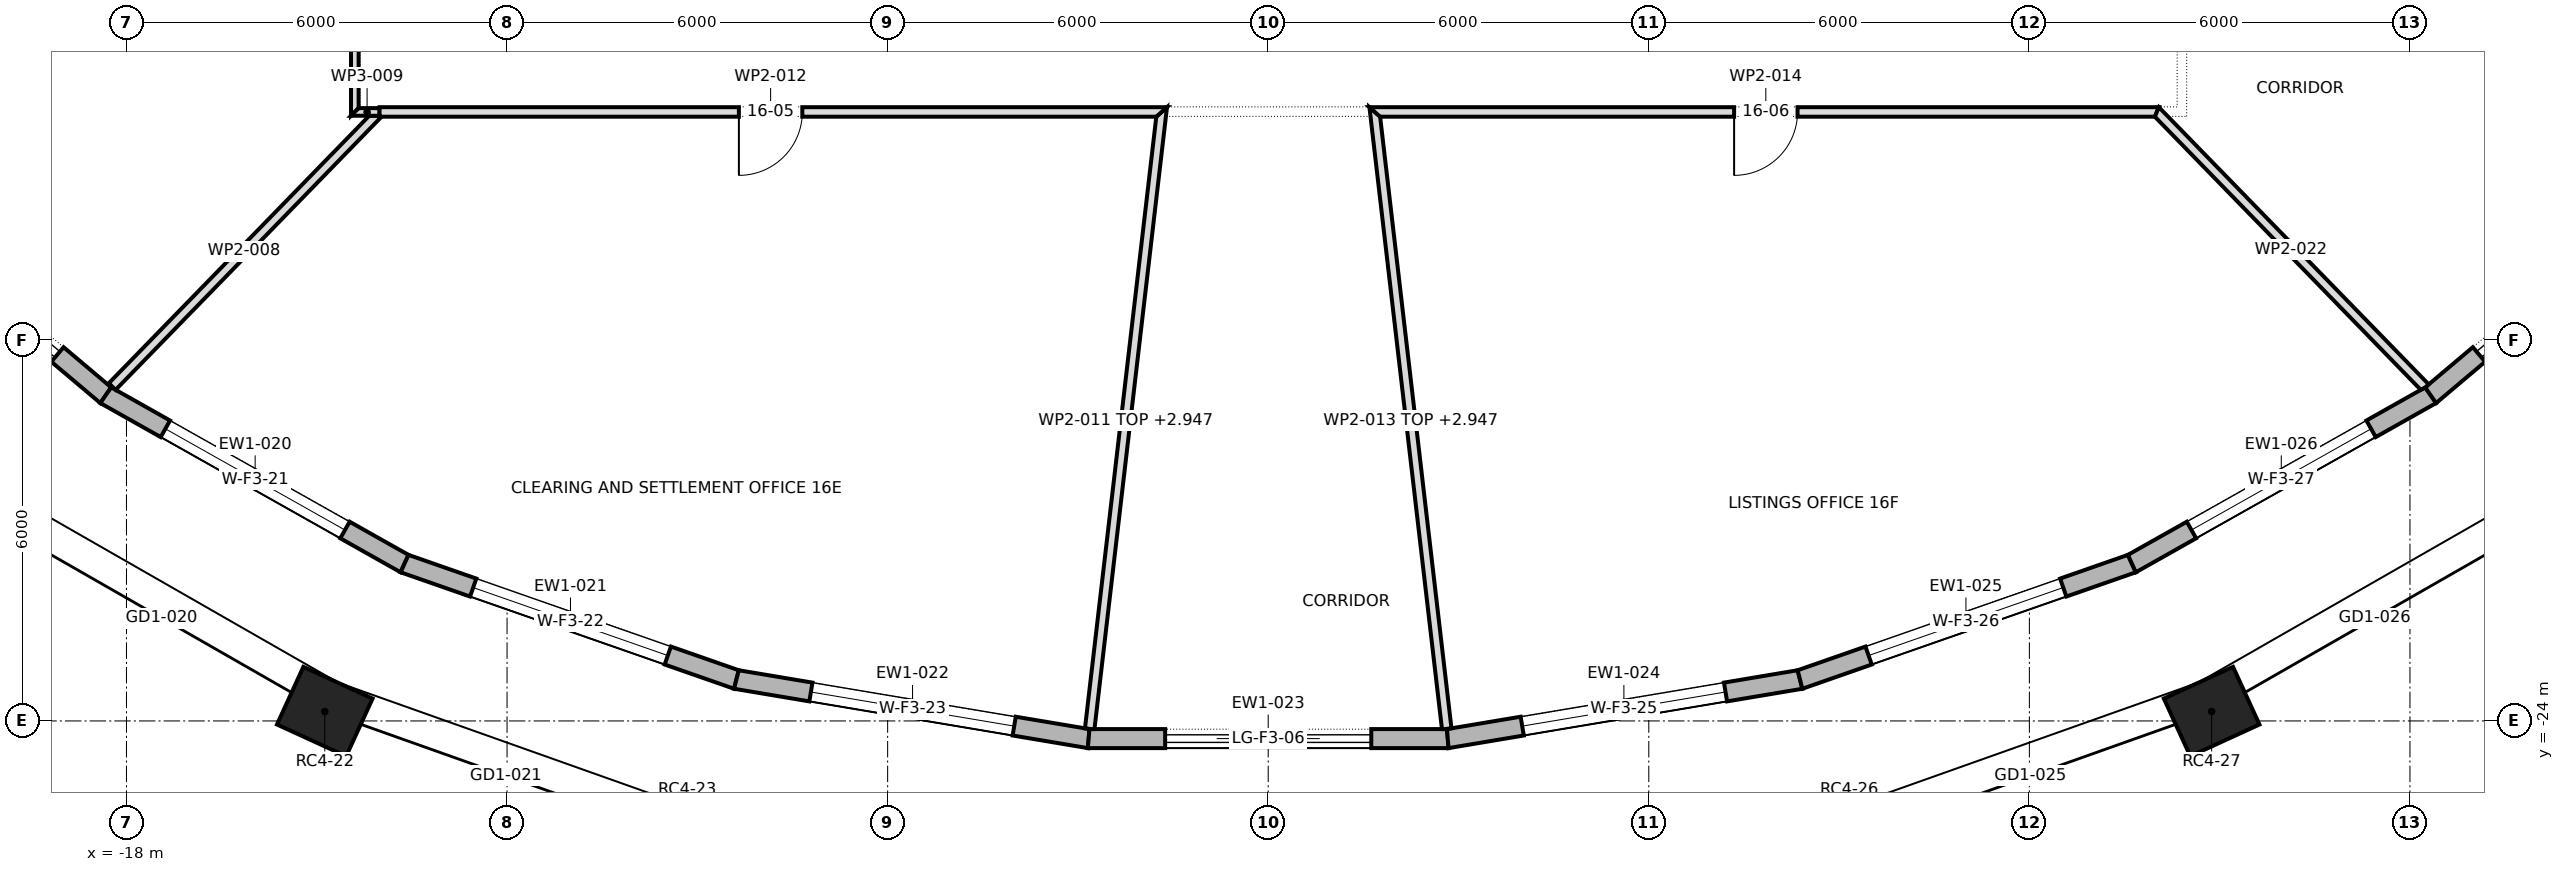
"""IFC4 building model, lengths in metres.
Left out: names, types, materials, properties, quantities, classifications, styles, units other than length and angle.
Written with IfcOpenShell. Run it as: python <this file> out.ifc"""

import sys

from ifc_helpers import new_model, si_unit, direction, frame, frame_2d, origin, origin_2d, place, context, subcontext, project, spatial, polyline, rectangle, outline, extrude, element, fill, save


model = new_model("IFC4")
c1 = context("Model", 3, precision=1e-05, world=origin(), true_north=direction((0.0, 1.0)))
c2 = subcontext(c1, "Body", "Model", "MODEL_VIEW")
j1 = project(units=[si_unit("LENGTHUNIT", "METRE"), si_unit("PLANEANGLEUNIT", "RADIAN")], contexts=[c1])
p1 = place(None, origin())
s1 = spatial("IfcSite", under=j1, at=p1, CompositionType="ELEMENT")
p2 = place(p1, origin())
s2 = spatial("IfcBuilding", under=s1, at=p2, CompositionType="ELEMENT")
p3 = place(p2, frame((0.0, 0.0, 226.9)))
s3 = spatial("IfcBuildingStorey", under=s2, at=p3, CompositionType="ELEMENT", Elevation=226.9)
for number, where, z_axis, x_axis in (
    (1, (-14.874, -23.852, 0.0), (0.0, 0.0, 1.0), (0.909, -0.417, 0.0)),
    (2, (14.874, -23.852, 0.0), (0.0, 0.0, 1.0), (0.909, 0.417, 0.0)),
):
    element("IfcColumn", number, at=place(p3, frame(where, z_axis=z_axis, x_axis=x_axis)), inside=s3, PredefinedType="COLUMN", context=c2, shape_type="SweptSolid", body=[
        extrude(rectangle(XDim=1.2, YDim=1.0, at=origin_2d()), origin(), (0.0, 0.0, 1.0), 4.0),
    ])
p4 = place(p3, frame((-22.334, -15.486, 0.0), z_axis=(0.0, 0.0, 1.0), x_axis=(0.764475071601, -0.644653290459, 0.0)))
e3 = element("IfcWall", 3, at=p4, inside=s3, PredefinedType="STANDARD", context=c2, shape_type="SweptSolid", body=[
    extrude(outline(polyline([(-0.015, -0.15), (5.257, -0.15), (5.229, 0.15), (0.015, 0.15), (-0.015, -0.15)])), origin(), (0.0, 0.0, 1.0), 3.7),
])
p5 = place(p4, frame((0.996, 0.0, 0.0)))
e4 = element("IfcOpeningElement", 4, at=p5, cuts=e3, PredefinedType="OPENING", context=c2, shape_type="SweptSolid", body=[
    extrude(rectangle(XDim=3.25, YDim=3.25, at=frame_2d((1.625, 1.625))), frame((0.0, 0.162, 0.0), z_axis=(0.0, -1.0, 0.0), x_axis=(1.0, 0.0, 0.0)), (0.0, 0.0, 1.0), 0.324),
])
p6 = place(p3, frame((-18.326, -18.865, 0.0), z_axis=(0.0, 0.0, 1.0), x_axis=(0.871225596594, -0.490882837181, 0.0)))
e5 = element("IfcWall", 5, at=p6, inside=s3, PredefinedType="STANDARD", context=c2, shape_type="SweptSolid", body=[
    extrude(outline(polyline([(-0.014, -0.15), (5.42, -0.15), (5.393, 0.15), (0.014, 0.15), (-0.014, -0.15)])), origin(), (0.0, 0.0, 1.0), 3.7),
])
p7 = place(p6, frame((1.078, 0.0, 0.6)))
e6 = element("IfcOpeningElement", 6, at=p7, cuts=e5, PredefinedType="OPENING", context=c2, shape_type="SweptSolid", body=[
    extrude(rectangle(XDim=3.25, YDim=2.65, at=frame_2d((1.625, 1.325))), frame((0.0, 0.162, 0.0), z_axis=(0.0, -1.0, 0.0), x_axis=(1.0, 0.0, 0.0)), (0.0, 0.0, 1.0), 0.324),
])
p8 = place(p3, frame((-13.616, -21.52, 0.0), z_axis=(0.0, 0.0, 1.0), x_axis=(0.944075859918, -0.329728328659, 0.0)))
e7 = element("IfcWall", 7, at=p8, inside=s3, PredefinedType="STANDARD", context=c2, shape_type="SweptSolid", body=[
    extrude(outline(polyline([(-0.013, -0.15), (5.555, -0.15), (5.53, 0.15), (0.013, 0.15), (-0.013, -0.15)])), origin(), (0.0, 0.0, 1.0), 3.7),
])
p9 = place(p8, frame((1.146, 0.0, 0.6)))
e8 = element("IfcOpeningElement", 8, at=p9, cuts=e7, PredefinedType="OPENING", context=c2, shape_type="SweptSolid", body=[
    extrude(rectangle(XDim=3.25, YDim=2.65, at=frame_2d((1.625, 1.325))), frame((0.0, 0.162, 0.0), z_axis=(0.0, -1.0, 0.0), x_axis=(1.0, 0.0, 0.0)), (0.0, 0.0, 1.0), 0.324),
])
p10 = place(p3, frame((-8.384, -23.347, 0.0), z_axis=(0.0, 0.0, 1.0), x_axis=(0.986223472554, -0.165418445715, 0.0)))
e9 = element("IfcWall", 9, at=p10, inside=s3, PredefinedType="STANDARD", context=c2, shape_type="SweptSolid", body=[
    extrude(outline(polyline([(-0.013, -0.15), (5.643, -0.15), (5.618, 0.15), (0.013, 0.15), (-0.013, -0.15)])), origin(), (0.0, 0.0, 1.0), 3.7),
])
p11 = place(p10, frame((1.19, 0.0, 0.6)))
e10 = element("IfcOpeningElement", 10, at=p11, cuts=e9, PredefinedType="OPENING", context=c2, shape_type="SweptSolid", body=[
    extrude(rectangle(XDim=3.25, YDim=2.65, at=frame_2d((1.625, 1.325))), frame((0.0, 0.162, 0.0), z_axis=(0.0, -1.0, 0.0), x_axis=(1.0, 0.0, 0.0)), (0.0, 0.0, 1.0), 0.324),
])
p12 = place(p3, frame((-2.831, -24.278, 0.0), z_axis=(0.0, 0.0, 1.0), x_axis=(1.0, 0.0, 0.0)))
e11 = element("IfcWall", 11, at=p12, inside=s3, PredefinedType="STANDARD", context=c2, shape_type="SweptSolid", body=[
    extrude(outline(polyline([(-0.012, -0.15), (5.674, -0.15), (5.649, 0.15), (0.012, 0.15), (-0.012, -0.15)])), origin(), (0.0, 0.0, 1.0), 3.7),
])
p13 = place(p12, frame((1.206, 0.0, 0.0)))
e12 = element("IfcOpeningElement", 12, at=p13, cuts=e11, PredefinedType="OPENING", context=c2, shape_type="SweptSolid", body=[
    extrude(rectangle(XDim=3.25, YDim=3.25, at=frame_2d((1.625, 1.625))), frame((0.0, 0.162, 0.0), z_axis=(0.0, -1.0, 0.0), x_axis=(1.0, 0.0, 0.0)), (0.0, 0.0, 1.0), 0.324),
])
p14 = place(p3, frame((2.831, -24.278, 0.0), z_axis=(0.0, 0.0, 1.0), x_axis=(0.986223472554, 0.165418445715, 0.0)))
e13 = element("IfcWall", 13, at=p14, inside=s3, PredefinedType="STANDARD", context=c2, shape_type="SweptSolid", body=[
    extrude(outline(polyline([(-0.012, -0.15), (5.643, -0.15), (5.618, 0.15), (0.012, 0.15), (-0.012, -0.15)])), origin(), (0.0, 0.0, 1.0), 3.7),
])
p15 = place(p14, frame((1.19, 0.0, 0.6)))
e14 = element("IfcOpeningElement", 14, at=p15, cuts=e13, PredefinedType="OPENING", context=c2, shape_type="SweptSolid", body=[
    extrude(rectangle(XDim=3.25, YDim=2.65, at=frame_2d((1.625, 1.325))), frame((0.0, 0.162, 0.0), z_axis=(0.0, -1.0, 0.0), x_axis=(1.0, 0.0, 0.0)), (0.0, 0.0, 1.0), 0.324),
])
p16 = place(p3, frame((8.384, -23.347, 0.0), z_axis=(0.0, 0.0, 1.0), x_axis=(0.944075859918, 0.329728328659, 0.0)))
e15 = element("IfcWall", 15, at=p16, inside=s3, PredefinedType="STANDARD", context=c2, shape_type="SweptSolid", body=[
    extrude(outline(polyline([(-0.013, -0.15), (5.556, -0.15), (5.529, 0.15), (0.013, 0.15), (-0.013, -0.15)])), origin(), (0.0, 0.0, 1.0), 3.7),
])
p17 = place(p16, frame((1.146, 0.0, 0.6)))
e16 = element("IfcOpeningElement", 16, at=p17, cuts=e15, PredefinedType="OPENING", context=c2, shape_type="SweptSolid", body=[
    extrude(rectangle(XDim=3.25, YDim=2.65, at=frame_2d((1.625, 1.325))), frame((0.0, 0.162, 0.0), z_axis=(0.0, -1.0, 0.0), x_axis=(1.0, 0.0, 0.0)), (0.0, 0.0, 1.0), 0.324),
])
p18 = place(p3, frame((13.616, -21.52, 0.0), z_axis=(0.0, 0.0, 1.0), x_axis=(0.871225596594, 0.490882837181, 0.0)))
e17 = element("IfcWall", 17, at=p18, inside=s3, PredefinedType="STANDARD", context=c2, shape_type="SweptSolid", body=[
    extrude(outline(polyline([(-0.013, -0.15), (5.421, -0.15), (5.393, 0.15), (0.013, 0.15), (-0.013, -0.15)])), origin(), (0.0, 0.0, 1.0), 3.7),
])
p19 = place(p18, frame((1.078, 0.0, 0.6)))
e18 = element("IfcOpeningElement", 18, at=p19, cuts=e17, PredefinedType="OPENING", context=c2, shape_type="SweptSolid", body=[
    extrude(rectangle(XDim=3.25, YDim=2.65, at=frame_2d((1.625, 1.325))), frame((0.0, 0.162, 0.0), z_axis=(0.0, -1.0, 0.0), x_axis=(1.0, 0.0, 0.0)), (0.0, 0.0, 1.0), 0.324),
])
p20 = place(p3, frame((18.326, -18.865, 0.0), z_axis=(0.0, 0.0, 1.0), x_axis=(0.764475071601, 0.644653290459, 0.0)))
e19 = element("IfcWall", 19, at=p20, inside=s3, PredefinedType="STANDARD", context=c2, shape_type="SweptSolid", body=[
    extrude(outline(polyline([(-0.014, -0.15), (5.258, -0.15), (5.228, 0.15), (0.014, 0.15), (-0.014, -0.15)])), origin(), (0.0, 0.0, 1.0), 3.7),
])
p21 = place(p20, frame((0.996, 0.0, 0.0)))
e20 = element("IfcOpeningElement", 20, at=p21, cuts=e19, PredefinedType="OPENING", context=c2, shape_type="SweptSolid", body=[
    extrude(rectangle(XDim=3.25, YDim=3.25, at=frame_2d((1.625, 1.625))), frame((0.0, 0.162, 0.0), z_axis=(0.0, -1.0, 0.0), x_axis=(1.0, 0.0, 0.0)), (0.0, 0.0, 1.0), 0.324),
])
p22 = place(p3, frame((-14.4, -14.46, 0.0), z_axis=(0.0, 0.0, 1.0), x_axis=(0.0, 1.0, 0.0)))
e21 = element("IfcWall", 21, at=p22, inside=s3, PredefinedType="PARTITIONING", context=c2, shape_type="SweptSolid", body=[
    extrude(outline(polyline([(7.97, 0.06), (5.978, 0.06), (3.985, 0.06), (1.992, 0.06), (0.0, 0.06), (0.12, -0.06), (2.083, -0.06), (4.045, -0.06), (6.008, -0.06), (7.97, -0.06), (7.97, 0.06)])), origin(), (0.0, 0.0, 1.0), 3.7),
])
p23 = place(p22, frame((3.515, 0.0, 0.0)))
e22 = element("IfcOpeningElement", 22, at=p23, cuts=e21, PredefinedType="OPENING", context=c2, shape_type="SweptSolid", body=[
    extrude(rectangle(XDim=1.0, YDim=2.1, at=frame_2d((0.5, 1.05))), frame((0.0, 0.072, 0.0), z_axis=(0.0, -1.0, 0.0), x_axis=(1.0, 0.0, 0.0)), (0.0, 0.0, 1.0), 0.144),
])
p24 = place(p3, frame((-14.032, -14.423, 0.0), z_axis=(0.0, 0.0, 1.0), x_axis=(-0.697618878337, -0.716469050684, 0.0)))
e23 = element("IfcWall", 23, at=p24, inside=s3, PredefinedType="PARTITIONING", context=c2, shape_type="SweptSolid", body=[
    extrude(outline(polyline([(0.0, 0.075), (0.0, 0.075), (0.022, 0.052), (0.011, 0.042), (0.125, -0.075), (2.086, -0.075), (4.048, -0.075), (6.01, -0.075), (6.01, 0.075), (4.507, 0.075), (3.005, 0.075), (1.502, 0.075), (0.0, 0.075)])), origin(), (0.0, 0.0, 1.0), 3.7),
])
p25 = place(p3, frame((-14.01, -14.4, 0.0), z_axis=(0.0, 0.0, 1.0), x_axis=(-1.0, 0.0, 0.0)))
e24 = element("IfcWall", 24, at=p25, inside=s3, PredefinedType="PARTITIONING", context=c2, shape_type="SweptSolid", body=[
    extrude(outline(polyline([(0.0, -0.06), (0.33, -0.06), (0.45, 0.06), (0.0, 0.06), (0.0, -0.06)])), origin(), (0.0, 0.0, 1.0), 3.7),
])
p26 = place(p3, frame((-2.814, -24.125, 0.0), z_axis=(0.0, 0.0, 1.0), x_axis=(0.115875821394, 0.993263708195, 0.0)))
e25 = element("IfcWall", 25, at=p26, inside=s3, PredefinedType="PARTITIONING", context=c2, shape_type="SweptSolid", body=[
    extrude(outline(polyline([(9.875, -0.075), (9.875, -0.075), (9.791, 0.0), (9.707, 0.075), (7.765, 0.075), (5.824, 0.075), (3.883, 0.075), (1.941, 0.075), (0.0, 0.075), (0.0, -0.029), (0.005, -0.075), (1.979, -0.075), (3.953, -0.075), (5.927, -0.075), (7.901, -0.075), (9.875, -0.075)])), origin(), (0.0, 0.0, 1.0), 2.947),
])
p27 = place(p3, frame((-1.596, -14.4, 0.0), z_axis=(0.0, 0.0, 1.0), x_axis=(-1.0, 0.0, 0.0)))
e26 = element("IfcWall", 26, at=p27, inside=s3, PredefinedType="PARTITIONING", context=c2, shape_type="SweptSolid", body=[
    extrude(outline(polyline([(12.414, 0.075), (10.665, 0.075), (8.916, 0.075), (7.166, 0.075), (5.417, 0.075), (3.667, 0.075), (1.918, 0.075), (0.168, 0.075), (0.0, -0.075), (0.0, -0.075), (1.773, -0.075), (3.547, -0.075), (5.32, -0.075), (7.094, -0.075), (8.867, -0.075), (10.641, -0.075), (12.414, -0.075), (12.414, 0.075)])), origin(), (0.0, 0.0, 1.0), 3.7),
])
p28 = place(p27, frame((5.749, 0.0, 0.0)))
e27 = element("IfcOpeningElement", 27, at=p28, cuts=e26, PredefinedType="OPENING", context=c2, shape_type="SweptSolid", body=[
    extrude(rectangle(XDim=1.0, YDim=2.1, at=frame_2d((0.5, 1.05))), frame((0.0, 0.087, 0.0), z_axis=(0.0, -1.0, 0.0), x_axis=(1.0, 0.0, 0.0)), (0.0, 0.0, 1.0), 0.174),
])
p29 = place(p3, frame((1.67, -14.316, 0.0), z_axis=(0.0, 0.0, 1.0), x_axis=(0.115875821394, -0.993263708195, 0.0)))
e28 = element("IfcWall", 28, at=p29, inside=s3, PredefinedType="PARTITIONING", context=c2, shape_type="SweptSolid", body=[
    extrude(outline(polyline([(0.0, -0.075), (1.974, -0.075), (3.948, -0.075), (5.922, -0.075), (7.896, -0.075), (9.87, -0.075), (9.875, -0.03), (9.875, 0.075), (7.934, 0.075), (5.992, 0.075), (4.051, 0.075), (2.11, 0.075), (0.168, 0.075), (0.084, 0.0), (0.0, -0.075), (0.0, -0.075)])), origin(), (0.0, 0.0, 1.0), 2.947),
])
p30 = place(p3, frame((14.042, -14.4, 0.0), z_axis=(0.0, 0.0, 1.0), x_axis=(-1.0, 0.0, 0.0)))
e29 = element("IfcWall", 29, at=p30, inside=s3, PredefinedType="PARTITIONING", context=c2, shape_type="SweptSolid", body=[
    extrude(outline(polyline([(12.446, -0.075), (12.446, -0.075), (12.278, 0.075), (10.533, 0.075), (8.788, 0.075), (7.043, 0.075), (5.298, 0.075), (3.553, 0.075), (1.808, 0.075), (0.063, 0.075), (0.0, -0.075), (1.778, -0.075), (3.556, -0.075), (5.334, -0.075), (7.112, -0.075), (8.89, -0.075), (10.668, -0.075), (12.446, -0.075)])), origin(), (0.0, 0.0, 1.0), 3.7),
])
p31 = place(p30, frame((5.697, 0.0, 0.0)))
e30 = element("IfcOpeningElement", 30, at=p31, cuts=e29, PredefinedType="OPENING", context=c2, shape_type="SweptSolid", body=[
    extrude(rectangle(XDim=1.0, YDim=2.1, at=frame_2d((0.5, 1.05))), frame((0.0, 0.087, 0.0), z_axis=(0.0, -1.0, 0.0), x_axis=(1.0, 0.0, 0.0)), (0.0, 0.0, 1.0), 0.174),
])
p32 = place(p3, frame((18.242, -18.747, 0.0), z_axis=(0.0, 0.0, 1.0), x_axis=(-0.697616683155, 0.716471188105, 0.0)))
e31 = element("IfcWall", 31, at=p32, inside=s3, PredefinedType="PARTITIONING", context=c2, shape_type="SweptSolid", body=[
    extrude(outline(polyline([(0.0, -0.075), (1.525, -0.075), (3.049, -0.075), (4.574, -0.075), (6.099, -0.075), (6.067, 0.0), (6.035, 0.075), (4.533, 0.075), (3.031, 0.075), (1.528, 0.075), (0.025, 0.075), (0.005, -0.002), (0.0, -0.072), (0.0, -0.075)])), origin(), (0.0, 0.0, 1.0), 3.7),
])
p33 = place(p3, frame((18.428, -12.76, 0.0), z_axis=(0.0, 0.0, 1.0), x_axis=(0.822939262801, -0.568129360041, 0.0)))
e32 = element("IfcWall", 32, at=p33, inside=s3, PredefinedType="PARTITIONING", context=c2, shape_type="SweptSolid", body=[
    extrude(outline(polyline([(0.0, -0.075), (1.531, -0.075), (3.063, -0.075), (4.594, -0.075), (4.615, 0.0), (4.619, 0.068), (4.619, 0.075), (3.079, 0.075), (1.54, 0.075), (0.0, 0.075), (0.0, 0.038), (0.001, 0.037), (0.0, 0.036), (0.0, -0.075)])), origin(), (0.0, 0.0, 1.0), 3.7),
])
p34 = place(p5, origin())
e33 = element("IfcDoor", 33, at=p34, inside=s3, OperationType="DOUBLE_DOOR_SLIDING", PredefinedType="DOOR", context=c2, shape_type="SweptSolid", body=[
    extrude(rectangle(XDim=3.25, YDim=3.25, at=frame_2d((1.625, 1.625))), frame((0.0, 0.025, 0.0), z_axis=(0.0, -1.0, 0.0), x_axis=(1.0, 0.0, 0.0)), (0.0, 0.0, 1.0), 0.05),
])
fill(e4, e33)
p35 = place(p7, origin())
e34 = element("IfcWindow", 34, at=p35, inside=s3, PartitioningType="TRIPLE_PANEL_VERTICAL", PredefinedType="WINDOW", context=c2, shape_type="SweptSolid", body=[
    extrude(rectangle(XDim=3.25, YDim=2.65, at=frame_2d((1.625, 1.325))), frame((0.0, 0.03, 0.0), z_axis=(0.0, -1.0, 0.0), x_axis=(1.0, 0.0, 0.0)), (0.0, 0.0, 1.0), 0.06),
])
fill(e6, e34)
p36 = place(p9, origin())
e35 = element("IfcWindow", 35, at=p36, inside=s3, PartitioningType="TRIPLE_PANEL_VERTICAL", PredefinedType="WINDOW", context=c2, shape_type="SweptSolid", body=[
    extrude(rectangle(XDim=3.25, YDim=2.65, at=frame_2d((1.625, 1.325))), frame((0.0, 0.03, 0.0), z_axis=(0.0, -1.0, 0.0), x_axis=(1.0, 0.0, 0.0)), (0.0, 0.0, 1.0), 0.06),
])
fill(e8, e35)
p37 = place(p11, origin())
e36 = element("IfcWindow", 36, at=p37, inside=s3, PartitioningType="TRIPLE_PANEL_VERTICAL", PredefinedType="WINDOW", context=c2, shape_type="SweptSolid", body=[
    extrude(rectangle(XDim=3.25, YDim=2.65, at=frame_2d((1.625, 1.325))), frame((0.0, 0.03, 0.0), z_axis=(0.0, -1.0, 0.0), x_axis=(1.0, 0.0, 0.0)), (0.0, 0.0, 1.0), 0.06),
])
fill(e10, e36)
p38 = place(p13, origin())
e37 = element("IfcDoor", 37, at=p38, inside=s3, OperationType="DOUBLE_DOOR_SLIDING", PredefinedType="DOOR", context=c2, shape_type="SweptSolid", body=[
    extrude(rectangle(XDim=3.25, YDim=3.25, at=frame_2d((1.625, 1.625))), frame((0.0, 0.025, 0.0), z_axis=(0.0, -1.0, 0.0), x_axis=(1.0, 0.0, 0.0)), (0.0, 0.0, 1.0), 0.05),
])
fill(e12, e37)
p39 = place(p15, origin())
e38 = element("IfcWindow", 38, at=p39, inside=s3, PartitioningType="TRIPLE_PANEL_VERTICAL", PredefinedType="WINDOW", context=c2, shape_type="SweptSolid", body=[
    extrude(rectangle(XDim=3.25, YDim=2.65, at=frame_2d((1.625, 1.325))), frame((0.0, 0.03, 0.0), z_axis=(0.0, -1.0, 0.0), x_axis=(1.0, 0.0, 0.0)), (0.0, 0.0, 1.0), 0.06),
])
fill(e14, e38)
p40 = place(p17, origin())
e39 = element("IfcWindow", 39, at=p40, inside=s3, PartitioningType="TRIPLE_PANEL_VERTICAL", PredefinedType="WINDOW", context=c2, shape_type="SweptSolid", body=[
    extrude(rectangle(XDim=3.25, YDim=2.65, at=frame_2d((1.625, 1.325))), frame((0.0, 0.03, 0.0), z_axis=(0.0, -1.0, 0.0), x_axis=(1.0, 0.0, 0.0)), (0.0, 0.0, 1.0), 0.06),
])
fill(e16, e39)
p41 = place(p19, origin())
e40 = element("IfcWindow", 40, at=p41, inside=s3, PartitioningType="TRIPLE_PANEL_VERTICAL", PredefinedType="WINDOW", context=c2, shape_type="SweptSolid", body=[
    extrude(rectangle(XDim=3.25, YDim=2.65, at=frame_2d((1.625, 1.325))), frame((0.0, 0.03, 0.0), z_axis=(0.0, -1.0, 0.0), x_axis=(1.0, 0.0, 0.0)), (0.0, 0.0, 1.0), 0.06),
])
fill(e18, e40)
p42 = place(p21, origin())
e41 = element("IfcDoor", 41, at=p42, inside=s3, OperationType="DOUBLE_DOOR_SLIDING", PredefinedType="DOOR", context=c2, shape_type="SweptSolid", body=[
    extrude(rectangle(XDim=3.25, YDim=3.25, at=frame_2d((1.625, 1.625))), frame((0.0, 0.025, 0.0), z_axis=(0.0, -1.0, 0.0), x_axis=(1.0, 0.0, 0.0)), (0.0, 0.0, 1.0), 0.05),
])
fill(e20, e41)
p43 = place(p28, origin())
e42 = element("IfcDoor", 42, at=p43, inside=s3, OperationType="SINGLE_SWING_LEFT", PredefinedType="DOOR", context=c2, shape_type="SweptSolid", body=[
    extrude(rectangle(XDim=1.0, YDim=2.1, at=frame_2d((0.5, 1.05))), frame((0.0, 0.025, 0.0), z_axis=(0.0, -1.0, 0.0), x_axis=(1.0, 0.0, 0.0)), (0.0, 0.0, 1.0), 0.05),
])
fill(e27, e42)
p44 = place(p31, origin())
e43 = element("IfcDoor", 43, at=p44, inside=s3, OperationType="SINGLE_SWING_LEFT", PredefinedType="DOOR", context=c2, shape_type="SweptSolid", body=[
    extrude(rectangle(XDim=1.0, YDim=2.1, at=frame_2d((0.5, 1.05))), frame((0.0, 0.025, 0.0), z_axis=(0.0, -1.0, 0.0), x_axis=(1.0, 0.0, 0.0)), (0.0, 0.0, 1.0), 0.05),
])
fill(e30, e43)
save(model, sys.argv[1])
